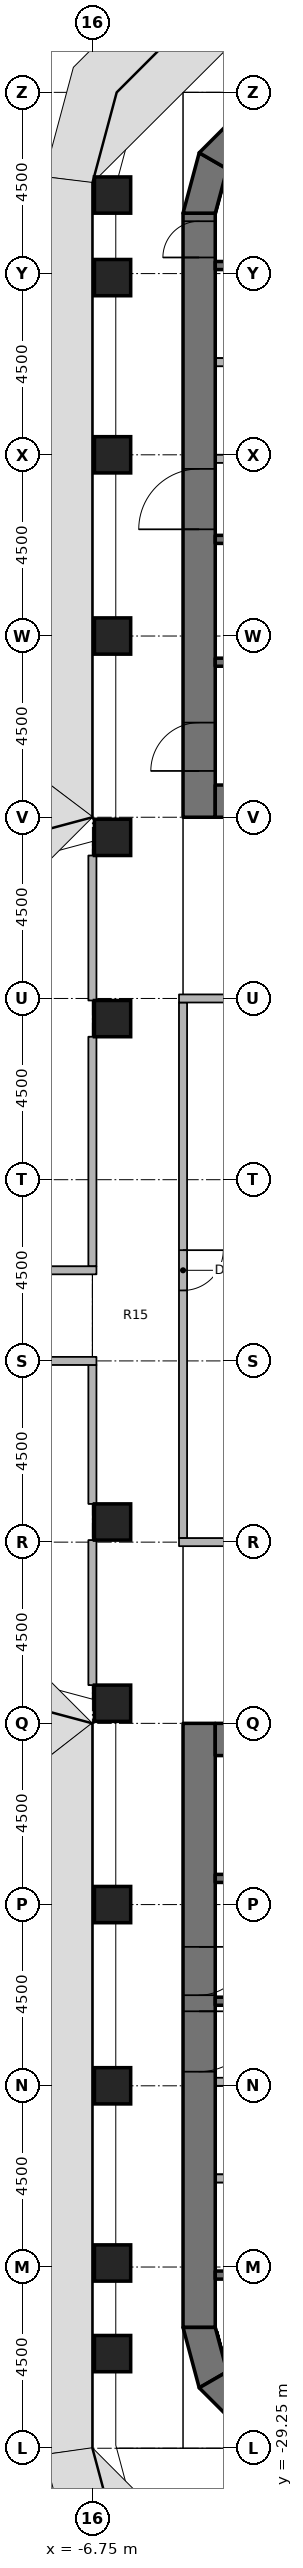
"""IFC4 building model, lengths in metres.
Left out: names, types, materials, properties, quantities, classifications, styles, units other than length and angle.
Written with IfcOpenShell. Run it as: python <this file> out.ifc"""

import sys

from ifc_helpers import new_model, si_unit, direction, frame, frame_2d, origin, origin_2d, place, context, subcontext, project, spatial, polyline, rectangle, outline, extrude, element, fill, save


model = new_model("IFC4")
c1 = context("Model", 3, precision=1e-05, world=origin(), true_north=direction((0.0, 1.0)))
c2 = subcontext(c1, "Body", "Model", "MODEL_VIEW")
j1 = project(units=[si_unit("LENGTHUNIT", "METRE"), si_unit("PLANEANGLEUNIT", "RADIAN")], contexts=[c1])
p1 = place(None, origin())
s1 = spatial("IfcSite", under=j1, at=p1, CompositionType="ELEMENT")
p2 = place(p1, origin())
s2 = spatial("IfcBuilding", under=s1, at=p2, CompositionType="ELEMENT")
p3 = place(p2, frame((0.0, 0.0, 132.2)))
s3 = spatial("IfcBuildingStorey", under=s2, at=p3, CompositionType="ELEMENT", Elevation=132.2)
for number, where, z_axis, x_axis in (
    (1, (-6.25, -26.9, 0.0), (0.0, 0.0, 1.0), (1.0, 0.0, 0.0)),
    (2, (-6.25, -24.65, 0.0), (0.0, 0.0, 1.0), (1.0, 0.0, 0.0)),
    (3, (-6.25, -20.25, 0.0), (0.0, 0.0, 1.0), (1.0, 0.0, 0.0)),
    (4, (-6.25, -15.75, 0.0), (0.0, 0.0, 1.0), (1.0, 0.0, 0.0)),
    (5, (-6.25, -10.75, 0.0), (0.0, 0.0, 1.0), (1.0, 0.0, 0.0)),
    (6, (-6.25, -6.25, 0.0), (0.0, 0.0, 1.0), (1.0, 0.0, 0.0)),
    (7, (-6.25, 6.25, 0.0), (0.0, 0.0, 1.0), (1.0, 0.0, 0.0)),
    (8, (-6.25, 10.75, 0.0), (0.0, 0.0, 1.0), (1.0, 0.0, 0.0)),
    (9, (-6.25, 15.75, 0.0), (0.0, 0.0, 1.0), (1.0, 0.0, 0.0)),
    (10, (-6.25, 20.25, 0.0), (0.0, 0.0, 1.0), (1.0, 0.0, 0.0)),
    (11, (-6.25, 24.65, 0.0), (0.0, 0.0, 1.0), (1.0, 0.0, 0.0)),
    (12, (-6.25, 26.7, 0.0), (0.0, 0.0, 1.0), (1.0, 0.0, 0.0)),
):
    element("IfcColumn", number, at=place(p3, frame(where, z_axis=z_axis, x_axis=x_axis)), inside=s3, PredefinedType="COLUMN", context=c2, shape_type="SweptSolid", body=[
        extrude(rectangle(XDim=0.9, YDim=0.9, at=origin_2d()), origin(), (0.0, 0.0, 1.0), 3.65),
    ])
p4 = place(p3, frame((-4.1, 11.25, 0.0), z_axis=(0.0, 0.0, 1.0), x_axis=(0.0, 1.0, 0.0)))
e13 = element("IfcWall", 13, at=p4, inside=s3, PredefinedType="SHEAR", context=c2, shape_type="SweptSolid", body=[
    extrude(rectangle(XDim=15.0, YDim=0.8, at=frame_2d((7.5, 0.0))), origin(), (0.0, 0.0, 1.0), 3.8),
])
p5 = place(p4, frame((7.15, 0.0, 0.0)))
e14 = element("IfcOpeningElement", 14, at=p5, cuts=e13, PredefinedType="OPENING", context=c2, shape_type="SweptSolid", body=[
    extrude(rectangle(XDim=1.5, YDim=2.3, at=frame_2d((0.75, 1.15))), frame((0.0, 0.41, 0.0), z_axis=(0.0, -1.0, 0.0), x_axis=(1.0, 0.0, 0.0)), (0.0, 0.0, 1.0), 0.82),
])
p6 = place(p4, frame((13.9, 0.0, 0.0)))
e15 = element("IfcOpeningElement", 15, at=p6, cuts=e13, PredefinedType="OPENING", context=c2, shape_type="SweptSolid", body=[
    extrude(rectangle(XDim=0.9, YDim=2.1, at=frame_2d((0.45, 1.05))), frame((0.0, 0.41, 0.0), z_axis=(0.0, -1.0, 0.0), x_axis=(1.0, 0.0, 0.0)), (0.0, 0.0, 1.0), 0.82),
])
p7 = place(p4, frame((1.15, 0.0, 0.0)))
e16 = element("IfcOpeningElement", 16, at=p7, cuts=e13, PredefinedType="OPENING", context=c2, shape_type="SweptSolid", body=[
    extrude(rectangle(XDim=1.2, YDim=2.1, at=frame_2d((0.6, 1.05))), frame((0.0, 0.41, 0.0), z_axis=(0.0, -1.0, 0.0), x_axis=(1.0, 0.0, 0.0)), (0.0, 0.0, 1.0), 0.82),
])
p8 = place(p3, frame((-3.7, 11.65, 0.0), z_axis=(0.0, 0.0, 1.0), x_axis=(1.0, 0.0, 0.0)))
e17 = element("IfcWall", 17, at=p8, inside=s3, PredefinedType="SHEAR", context=c2, shape_type="SweptSolid", body=[
    extrude(rectangle(XDim=7.4, YDim=0.8, at=frame_2d((3.7, 0.0))), origin(), (0.0, 0.0, 1.0), 3.8),
])
p9 = place(p3, origin())
e18 = element("IfcWall", 18, at=p9, inside=s3, PredefinedType="SHEAR", context=c2, shape_type="SweptSolid", body=[
    extrude(outline(polyline([(-4.5, 26.25), (-4.098, 27.75), (-3.405, 27.35), (-3.7, 26.25), (-4.5, 26.25)])), origin(), (0.0, 0.0, 1.0), 3.8),
])
p10 = place(p3, origin())
e19 = element("IfcWall", 19, at=p10, inside=s3, PredefinedType="SHEAR", context=c2, shape_type="SweptSolid", body=[
    extrude(outline(polyline([(-4.098, 27.75), (-3.0, 28.848), (-2.6, 28.155), (-3.405, 27.35), (-4.098, 27.75)])), origin(), (0.0, 0.0, 1.0), 3.8),
])
p11 = place(p3, frame((-4.1, -11.25, 0.0), z_axis=(0.0, 0.0, 1.0), x_axis=(0.0, -1.0, 0.0)))
e20 = element("IfcWall", 20, at=p11, inside=s3, PredefinedType="SHEAR", context=c2, shape_type="SweptSolid", body=[
    extrude(rectangle(XDim=15.0, YDim=0.8, at=frame_2d((7.5, 0.0))), origin(), (0.0, 0.0, 1.0), 3.8),
])
p12 = place(p11, frame((7.15, 0.0, 0.0)))
e21 = element("IfcOpeningElement", 21, at=p12, cuts=e20, PredefinedType="OPENING", context=c2, shape_type="SweptSolid", body=[
    extrude(rectangle(XDim=1.5, YDim=2.3, at=frame_2d((0.75, 1.15))), frame((0.0, 0.41, 0.0), z_axis=(0.0, -1.0, 0.0), x_axis=(1.0, 0.0, 0.0)), (0.0, 0.0, 1.0), 0.82),
])
p13 = place(p11, frame((5.55, 0.0, 0.0)))
e22 = element("IfcOpeningElement", 22, at=p13, cuts=e20, PredefinedType="OPENING", context=c2, shape_type="SweptSolid", body=[
    extrude(rectangle(XDim=1.2, YDim=2.1, at=frame_2d((0.6, 1.05))), frame((0.0, 0.41, 0.0), z_axis=(0.0, -1.0, 0.0), x_axis=(1.0, 0.0, 0.0)), (0.0, 0.0, 1.0), 0.82),
])
p14 = place(p3, frame((-3.7, -11.65, 0.0), z_axis=(0.0, 0.0, 1.0), x_axis=(1.0, 0.0, 0.0)))
e23 = element("IfcWall", 23, at=p14, inside=s3, PredefinedType="SHEAR", context=c2, shape_type="SweptSolid", body=[
    extrude(rectangle(XDim=7.4, YDim=0.8, at=frame_2d((3.7, 0.0))), origin(), (0.0, 0.0, 1.0), 3.8),
])
p15 = place(p3, origin())
e24 = element("IfcWall", 24, at=p15, inside=s3, PredefinedType="SHEAR", context=c2, shape_type="SweptSolid", body=[
    extrude(outline(polyline([(-4.5, -26.25), (-4.098, -27.75), (-3.405, -27.35), (-3.7, -26.25), (-4.5, -26.25)])), origin(), (0.0, 0.0, 1.0), 3.8),
])
p16 = place(p3, origin())
e25 = element("IfcWall", 25, at=p16, inside=s3, PredefinedType="SHEAR", context=c2, shape_type="SweptSolid", body=[
    extrude(outline(polyline([(-4.098, -27.75), (-3.0, -28.848), (-2.6, -28.155), (-3.405, -27.35), (-4.098, -27.75)])), origin(), (0.0, 0.0, 1.0), 3.8),
])
for number, where, z_axis, x_axis in (
    (26, (-3.7, 24.95, 0.0), (0.0, 0.0, 1.0), (1.0, 0.0, 0.0)),
    (27, (-3.7, 18.15, 0.0), (0.0, 0.0, 1.0), (1.0, 0.0, 0.0)),
    (28, (-3.7, 15.1, 0.0), (0.0, 0.0, 1.0), (1.0, 0.0, 0.0)),
):
    element("IfcWall", number, at=place(p3, frame(where, z_axis=z_axis, x_axis=x_axis)), inside=s3, PredefinedType="SHEAR", context=c2, shape_type="SweptSolid", body=[
        extrude(rectangle(XDim=7.4, YDim=0.2, at=frame_2d((3.7, 0.0))), origin(), (0.0, 0.0, 1.0), 3.65),
    ])
p17 = place(p3, frame((-3.7, 20.15, 0.0), z_axis=(0.0, 0.0, 1.0), x_axis=(1.0, 0.0, 0.0)))
e29 = element("IfcWall", 29, at=p17, inside=s3, PredefinedType="PARTITIONING", context=c2, shape_type="SweptSolid", body=[
    extrude(rectangle(XDim=2.8, YDim=0.2, at=frame_2d((1.4, 0.0))), origin(), (0.0, 0.0, 1.0), 3.65),
])
p18 = place(p3, frame((-3.7, 22.55, 0.0), z_axis=(0.0, 0.0, 1.0), x_axis=(1.0, 0.0, 0.0)))
e30 = element("IfcWall", 30, at=p18, inside=s3, PredefinedType="PARTITIONING", context=c2, shape_type="SweptSolid", body=[
    extrude(rectangle(XDim=2.6, YDim=0.2, at=frame_2d((1.3, 0.0))), origin(), (0.0, 0.0, 1.0), 3.65),
])
for number, where, z_axis, x_axis in (
    (31, (3.7, -24.95, 0.0), (0.0, 0.0, 1.0), (-1.0, 0.0, 0.0)),
    (32, (3.7, -18.15, 0.0), (0.0, 0.0, 1.0), (-1.0, 0.0, 0.0)),
    (33, (3.7, -15.1, 0.0), (0.0, 0.0, 1.0), (-1.0, 0.0, 0.0)),
):
    element("IfcWall", number, at=place(p3, frame(where, z_axis=z_axis, x_axis=x_axis)), inside=s3, PredefinedType="SHEAR", context=c2, shape_type="SweptSolid", body=[
        extrude(rectangle(XDim=7.4, YDim=0.2, at=frame_2d((3.7, 0.0))), origin(), (0.0, 0.0, 1.0), 3.65),
    ])
p19 = place(p3, frame((-0.9, -20.15, 0.0), z_axis=(0.0, 0.0, 1.0), x_axis=(-1.0, 0.0, 0.0)))
e34 = element("IfcWall", 34, at=p19, inside=s3, PredefinedType="PARTITIONING", context=c2, shape_type="SweptSolid", body=[
    extrude(rectangle(XDim=2.8, YDim=0.2, at=frame_2d((1.4, 0.0))), origin(), (0.0, 0.0, 1.0), 3.65),
])
p20 = place(p3, frame((-1.1, -22.55, 0.0), z_axis=(0.0, 0.0, 1.0), x_axis=(-1.0, 0.0, 0.0)))
e35 = element("IfcWall", 35, at=p20, inside=s3, PredefinedType="PARTITIONING", context=c2, shape_type="SweptSolid", body=[
    extrude(rectangle(XDim=2.6, YDim=0.2, at=frame_2d((1.3, 0.0))), origin(), (0.0, 0.0, 1.0), 3.65),
])
p21 = place(p3, frame((-4.5, 6.65, 0.0), z_axis=(0.0, 0.0, 1.0), x_axis=(0.0, -1.0, 0.0)))
e36 = element("IfcWall", 36, at=p21, inside=s3, PredefinedType="PARTITIONING", context=c2, shape_type="SweptSolid", body=[
    extrude(rectangle(XDim=13.3, YDim=0.2, at=frame_2d((6.65, 0.0))), origin(), (0.0, 0.0, 1.0), 2.738),
])
p22 = place(p21, frame((6.15, 0.0, 0.0)))
e37 = element("IfcOpeningElement", 37, at=p22, cuts=e36, PredefinedType="OPENING", context=c2, shape_type="SweptSolid", body=[
    extrude(rectangle(XDim=1.0, YDim=2.1, at=frame_2d((0.5, 1.05))), frame((0.0, 0.11, 0.0), z_axis=(0.0, -1.0, 0.0), x_axis=(1.0, 0.0, 0.0)), (0.0, 0.0, 1.0), 0.22),
])
p23 = place(p3, frame((-6.75, 0.1, 0.0), z_axis=(0.0, 0.0, 1.0), x_axis=(0.0, 1.0, 0.0)))
e38 = element("IfcWall", 38, at=p23, inside=s3, PredefinedType="PARTITIONING", context=c2, shape_type="SweptSolid", body=[
    extrude(rectangle(XDim=5.7, YDim=0.2, at=frame_2d((2.85, 0.0))), origin(), (0.0, 0.0, 1.0), 2.738),
])
for number, where, z_axis, x_axis in (
    (39, (-6.75, 6.7, 0.0), (0.0, 0.0, 1.0), (0.0, 1.0, 0.0)),
    (40, (-6.75, -10.3, 0.0), (0.0, 0.0, 1.0), (0.0, 1.0, 0.0)),
):
    element("IfcWall", number, at=place(p3, frame(where, z_axis=z_axis, x_axis=x_axis)), inside=s3, PredefinedType="PARTITIONING", context=c2, shape_type="SweptSolid", body=[
        extrude(rectangle(XDim=3.6, YDim=0.2, at=frame_2d((1.8, 0.0))), origin(), (0.0, 0.0, 1.0), 2.738),
    ])
p24 = place(p3, frame((-6.75, -5.8, 0.0), z_axis=(0.0, 0.0, 1.0), x_axis=(0.0, 1.0, 0.0)))
e41 = element("IfcWall", 41, at=p24, inside=s3, PredefinedType="PARTITIONING", context=c2, shape_type="SweptSolid", body=[
    extrude(rectangle(XDim=3.45, YDim=0.2, at=frame_2d((1.725, 0.0))), origin(), (0.0, 0.0, 1.0), 2.738),
])
for number, where, z_axis, x_axis in (
    (42, (-4.6, 6.75, 0.0), (0.0, 0.0, 1.0), (1.0, 0.0, 0.0)),
    (43, (-4.6, -6.75, 0.0), (0.0, 0.0, 1.0), (1.0, 0.0, 0.0)),
):
    element("IfcWall", number, at=place(p3, frame(where, z_axis=z_axis, x_axis=x_axis)), inside=s3, PredefinedType="PARTITIONING", context=c2, shape_type="SweptSolid", body=[
        extrude(rectangle(XDim=4.7, YDim=0.2, at=frame_2d((2.35, 0.0))), origin(), (0.0, 0.0, 1.0), 2.738),
    ])
p25 = place(p3, frame((-11.35, 0.0, 0.0), z_axis=(0.0, 0.0, 1.0), x_axis=(1.0, 0.0, 0.0)))
e44 = element("IfcWall", 44, at=p25, inside=s3, PredefinedType="PARTITIONING", context=c2, shape_type="SweptSolid", body=[
    extrude(rectangle(XDim=4.7, YDim=0.2, at=frame_2d((2.35, 0.0))), origin(), (0.0, 0.0, 1.0), 2.738),
])
p26 = place(p25, frame((1.85, 0.0, 0.0)))
e45 = element("IfcOpeningElement", 45, at=p26, cuts=e44, PredefinedType="OPENING", context=c2, shape_type="SweptSolid", body=[
    extrude(rectangle(XDim=1.0, YDim=2.1, at=frame_2d((0.5, 1.05))), frame((0.0, 0.11, 0.0), z_axis=(0.0, -1.0, 0.0), x_axis=(1.0, 0.0, 0.0)), (0.0, 0.0, 1.0), 0.22),
])
p27 = place(p3, frame((-6.65, -2.25, 0.0), z_axis=(0.0, 0.0, 1.0), x_axis=(-1.0, 0.0, 0.0)))
e46 = element("IfcWall", 46, at=p27, inside=s3, PredefinedType="PARTITIONING", context=c2, shape_type="SweptSolid", body=[
    extrude(rectangle(XDim=4.7, YDim=0.2, at=frame_2d((2.35, 0.0))), origin(), (0.0, 0.0, 1.0), 2.738),
])
p28 = place(p27, frame((1.85, 0.0, 0.0)))
e47 = element("IfcOpeningElement", 47, at=p28, cuts=e46, PredefinedType="OPENING", context=c2, shape_type="SweptSolid", body=[
    extrude(rectangle(XDim=1.0, YDim=2.1, at=frame_2d((0.5, 1.05))), frame((0.0, 0.11, 0.0), z_axis=(0.0, -1.0, 0.0), x_axis=(1.0, 0.0, 0.0)), (0.0, 0.0, 1.0), 0.22),
])
p29 = place(p5, origin())
e48 = element("IfcDoor", 48, at=p29, inside=s3, OperationType="DOUBLE_DOOR_SINGLE_SWING", PredefinedType="DOOR", context=c2, shape_type="SweptSolid", body=[
    extrude(rectangle(XDim=1.5, YDim=2.3, at=frame_2d((0.75, 1.15))), frame((0.0, 0.025, 0.0), z_axis=(0.0, -1.0, 0.0), x_axis=(1.0, 0.0, 0.0)), (0.0, 0.0, 1.0), 0.05),
])
fill(e14, e48)
p30 = place(p6, origin())
e49 = element("IfcDoor", 49, at=p30, inside=s3, OperationType="SINGLE_SWING_RIGHT", PredefinedType="DOOR", context=c2, shape_type="SweptSolid", body=[
    extrude(rectangle(XDim=0.9, YDim=2.1, at=frame_2d((0.45, 1.05))), frame((0.0, 0.025, 0.0), z_axis=(0.0, -1.0, 0.0), x_axis=(1.0, 0.0, 0.0)), (0.0, 0.0, 1.0), 0.05),
])
fill(e15, e49)
p31 = place(p7, origin())
e50 = element("IfcDoor", 50, at=p31, inside=s3, OperationType="SINGLE_SWING_RIGHT", PredefinedType="DOOR", context=c2, shape_type="SweptSolid", body=[
    extrude(rectangle(XDim=1.2, YDim=2.1, at=frame_2d((0.6, 1.05))), frame((0.0, 0.025, 0.0), z_axis=(0.0, -1.0, 0.0), x_axis=(1.0, 0.0, 0.0)), (0.0, 0.0, 1.0), 0.05),
])
fill(e16, e50)
p32 = place(p12, origin())
e51 = element("IfcDoor", 51, at=p32, inside=s3, OperationType="DOUBLE_DOOR_SINGLE_SWING", PredefinedType="DOOR", context=c2, shape_type="SweptSolid", body=[
    extrude(rectangle(XDim=1.5, YDim=2.3, at=frame_2d((0.75, 1.15))), frame((0.0, 0.025, 0.0), z_axis=(0.0, -1.0, 0.0), x_axis=(1.0, 0.0, 0.0)), (0.0, 0.0, 1.0), 0.05),
])
fill(e21, e51)
p33 = place(p13, origin())
e52 = element("IfcDoor", 52, at=p33, inside=s3, OperationType="SINGLE_SWING_RIGHT", PredefinedType="DOOR", context=c2, shape_type="SweptSolid", body=[
    extrude(rectangle(XDim=1.2, YDim=2.1, at=frame_2d((0.6, 1.05))), frame((0.0, 0.025, 0.0), z_axis=(0.0, -1.0, 0.0), x_axis=(1.0, 0.0, 0.0)), (0.0, 0.0, 1.0), 0.05),
])
fill(e22, e52)
p34 = place(p22, origin())
e53 = element("IfcDoor", 53, at=p34, inside=s3, OperationType="SINGLE_SWING_RIGHT", PredefinedType="DOOR", context=c2, shape_type="SweptSolid", body=[
    extrude(rectangle(XDim=1.0, YDim=2.1, at=frame_2d((0.5, 1.05))), frame((0.0, 0.025, 0.0), z_axis=(0.0, -1.0, 0.0), x_axis=(1.0, 0.0, 0.0)), (0.0, 0.0, 1.0), 0.05),
])
fill(e37, e53)
save(model, sys.argv[1])
